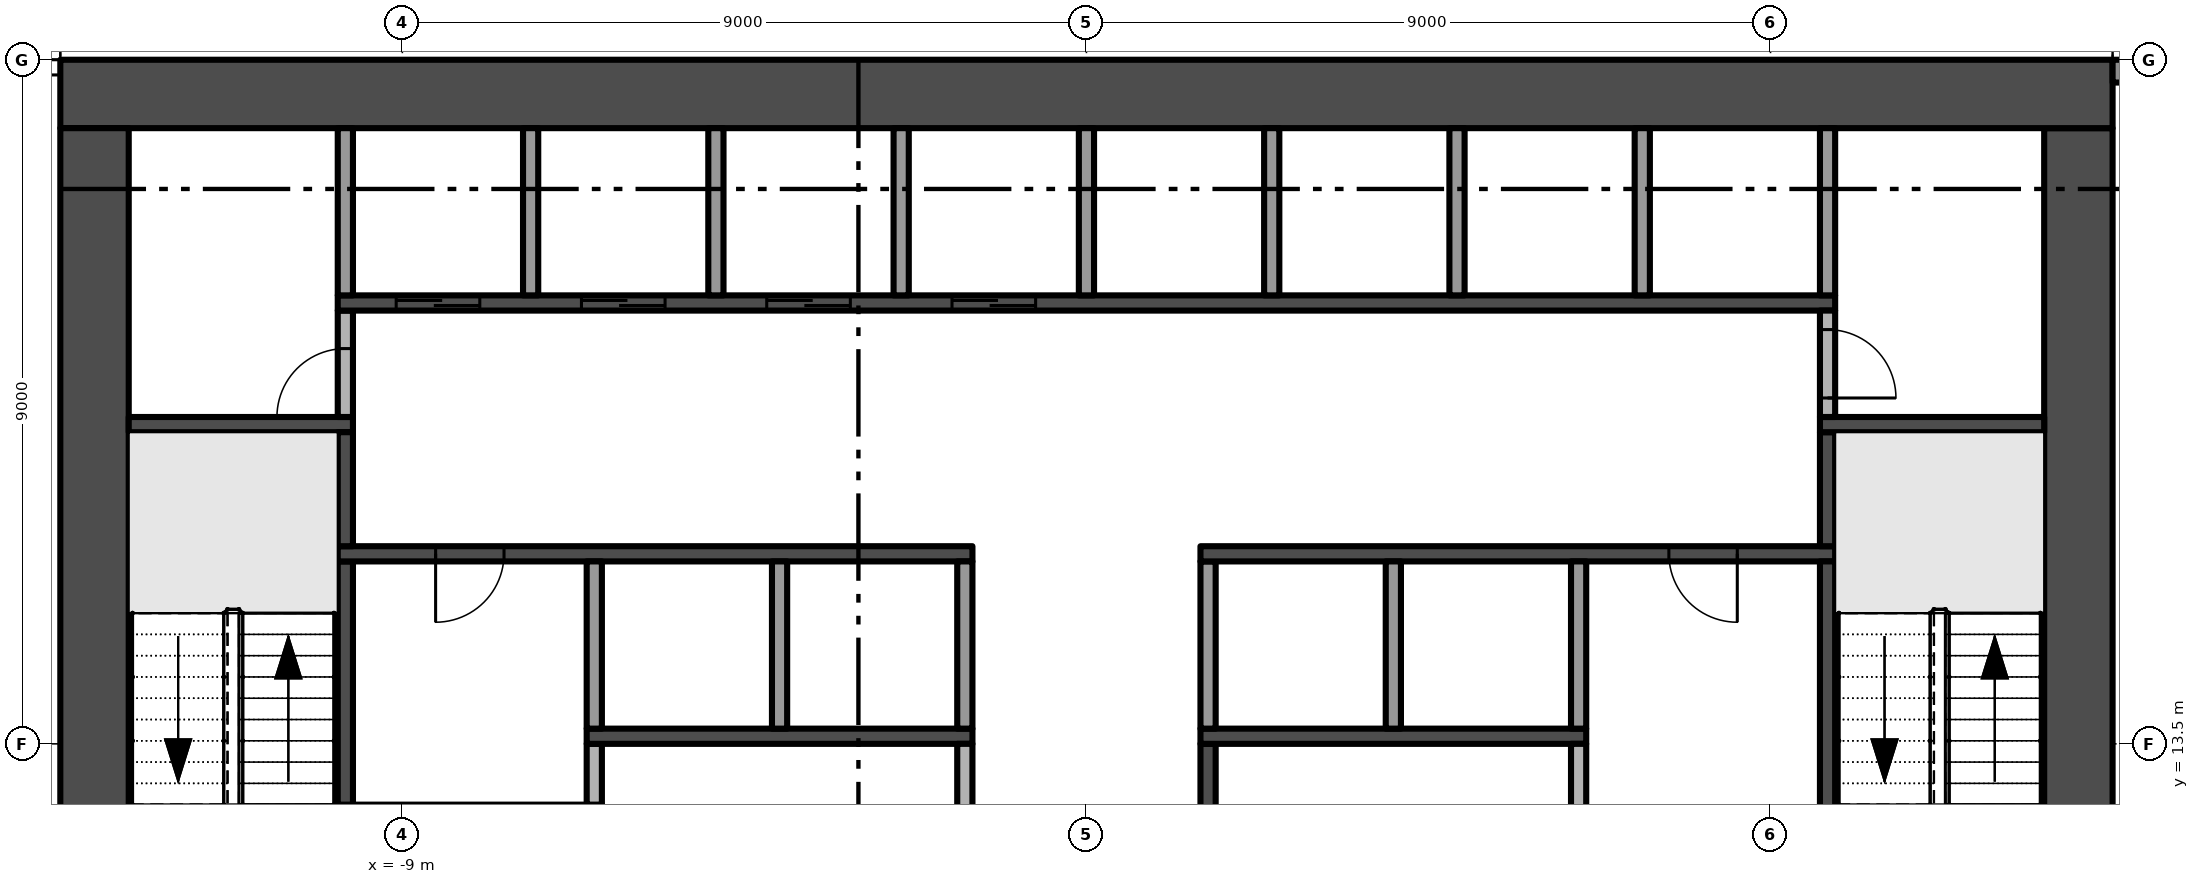
"""IFC4 building model, lengths in metres.
Left out: names, types, materials, properties, quantities, classifications, styles, units other than length and angle.
Written with IfcOpenShell. Run it as: python <this file> out.ifc"""

import sys

from ifc_helpers import new_model, si_unit, direction, frame, frame_2d, origin, place, context, subcontext, project, spatial, rectangle, extrude, element, fill, save


model = new_model("IFC4")
c1 = context("Model", 3, precision=1e-05, world=origin(), true_north=direction((0.0, 1.0)))
c2 = subcontext(c1, "Body", "Model", "MODEL_VIEW")
j1 = project(units=[si_unit("LENGTHUNIT", "METRE"), si_unit("PLANEANGLEUNIT", "RADIAN")], contexts=[c1])
p1 = place(None, origin())
s1 = spatial("IfcSite", under=j1, at=p1, CompositionType="ELEMENT")
p2 = place(p1, origin())
s2 = spatial("IfcBuilding", under=s1, at=p2, CompositionType="ELEMENT")
p3 = place(p2, frame((0.0, 0.0, 64.4)))
s3 = spatial("IfcBuildingStorey", under=s2, at=p3, CompositionType="ELEMENT", Elevation=64.4)
p4 = place(p3, frame((13.05, 5.4, -0.3), z_axis=(0.0, 0.0, 1.0), x_axis=(0.0, 1.0, 0.0)))
e1 = element("IfcWall", 1, at=p4, inside=s3, PredefinedType="SHEAR", context=c2, shape_type="SweptSolid", body=[
    extrude(rectangle(XDim=16.2, YDim=0.9, at=frame_2d((8.1, 0.0))), origin(), (0.0, 0.0, 1.0), 5.0),
])
p5 = place(p4, frame((6.0, 0.0, 0.3)))
e2 = element("IfcOpeningElement", 2, at=p5, cuts=e1, PredefinedType="OPENING", context=c2, shape_type="SweptSolid", body=[
    extrude(rectangle(XDim=1.2, YDim=2.2, at=frame_2d((0.6, 1.1))), frame((0.0, 0.46, 0.0), z_axis=(0.0, -1.0, 0.0), x_axis=(1.0, 0.0, 0.0)), (0.0, 0.0, 1.0), 0.92),
])
p6 = place(p3, frame((13.5, 22.05, -0.3), z_axis=(0.0, 0.0, 1.0), x_axis=(-1.0, 0.0, 0.0)))
e3 = element("IfcWall", 3, at=p6, inside=s3, PredefinedType="SHEAR", context=c2, shape_type="SweptSolid", body=[
    extrude(rectangle(XDim=27.0, YDim=0.9, at=frame_2d((13.5, 0.0))), origin(), (0.0, 0.0, 1.0), 5.0),
])
p7 = place(p3, frame((-13.05, 21.6, -0.3), z_axis=(0.0, 0.0, 1.0), x_axis=(0.0, -1.0, 0.0)))
e4 = element("IfcWall", 4, at=p7, inside=s3, PredefinedType="SHEAR", context=c2, shape_type="SweptSolid", body=[
    extrude(rectangle(XDim=16.2, YDim=0.9, at=frame_2d((8.1, 0.0))), origin(), (0.0, 0.0, 1.0), 5.0),
])
p8 = place(p7, frame((9.0, 0.0, 0.3)))
e5 = element("IfcOpeningElement", 5, at=p8, cuts=e4, PredefinedType="OPENING", context=c2, shape_type="SweptSolid", body=[
    extrude(rectangle(XDim=1.2, YDim=2.2, at=frame_2d((0.6, 1.1))), frame((0.0, 0.46, 0.0), z_axis=(0.0, -1.0, 0.0), x_axis=(1.0, 0.0, 0.0)), (0.0, 0.0, 1.0), 0.92),
])
p9 = place(p3, frame((13.5, 22.35, 0.0), z_axis=(0.0, 0.0, 1.0), x_axis=(1.0, 0.0, 0.0)))
e6 = element("IfcWall", 6, at=p9, inside=s3, PredefinedType="SOLIDWALL", context=c2, shape_type="SweptSolid", body=[
    extrude(rectangle(XDim=3.825, YDim=0.3, at=frame_2d((1.913, 0.0))), origin(), (0.0, 0.0, 1.0), 4.7),
])
p10 = place(p9, frame((0.775, 0.0, 0.0)))
e7 = element("IfcOpeningElement", 7, at=p10, cuts=e6, PredefinedType="OPENING", context=c2, shape_type="SweptSolid", body=[
    extrude(rectangle(XDim=2.725, YDim=2.4, at=frame_2d((1.363, 1.2))), frame((0.0, 0.16, 0.0), z_axis=(0.0, -1.0, 0.0), x_axis=(1.0, 0.0, 0.0)), (0.0, 0.0, 1.0), 0.32),
])
p11 = place(p3, frame((-12.6, 17.7, 0.0), z_axis=(0.0, 0.0, 1.0), x_axis=(1.0, 0.0, 0.0)))
e8 = element("IfcWall", 8, at=p11, inside=s3, PredefinedType="SHEAR", context=c2, shape_type="SweptSolid", body=[
    extrude(rectangle(XDim=2.95, YDim=0.2, at=frame_2d((1.475, 0.0))), origin(), (0.0, 0.0, 1.0), 4.7),
])
p12 = place(p3, frame((-9.75, 12.7, 0.0), z_axis=(0.0, 0.0, 1.0), x_axis=(0.0, 1.0, 0.0)))
e9 = element("IfcWall", 9, at=p12, inside=s3, PredefinedType="SHEAR", context=c2, shape_type="SweptSolid", body=[
    extrude(rectangle(XDim=3.2, YDim=0.2, at=frame_2d((1.6, 0.0))), origin(), (0.0, 0.0, 1.0), 4.7),
])
p13 = place(p3, frame((-1.5, 16.0, 0.0), z_axis=(0.0, 0.0, 1.0), x_axis=(-1.0, 0.0, 0.0)))
e10 = element("IfcWall", 10, at=p13, inside=s3, PredefinedType="SHEAR", context=c2, shape_type="SweptSolid", body=[
    extrude(rectangle(XDim=8.35, YDim=0.2, at=frame_2d((4.175, 0.0))), origin(), (0.0, 0.0, 1.0), 4.7),
])
p14 = place(p13, frame((6.162, 0.0, 0.0)))
e11 = element("IfcOpeningElement", 11, at=p14, cuts=e10, PredefinedType="OPENING", context=c2, shape_type="SweptSolid", body=[
    extrude(rectangle(XDim=0.9, YDim=2.1, at=frame_2d((0.45, 1.05))), frame((0.0, 0.11, 0.0), z_axis=(0.0, -1.0, 0.0), x_axis=(1.0, 0.0, 0.0)), (0.0, 0.0, 1.0), 0.22),
])
p15 = place(p3, frame((-9.75, 16.1, 0.0), z_axis=(0.0, 0.0, 1.0), x_axis=(0.0, 1.0, 0.0)))
e12 = element("IfcWall", 12, at=p15, inside=s3, PredefinedType="SHEAR", context=c2, shape_type="SweptSolid", body=[
    extrude(rectangle(XDim=1.5, YDim=0.2, at=frame_2d((0.75, 0.0))), origin(), (0.0, 0.0, 1.0), 4.7),
])
p16 = place(p3, frame((-9.75, 17.8, 0.0), z_axis=(0.0, 0.0, 1.0), x_axis=(0.0, 1.0, 0.0)))
e13 = element("IfcWall", 13, at=p16, inside=s3, PredefinedType="PARTITIONING", context=c2, shape_type="SweptSolid", body=[
    extrude(rectangle(XDim=1.4, YDim=0.2, at=frame_2d((0.7, 0.0))), origin(), (0.0, 0.0, 1.0), 4.7),
])
p17 = place(p16, origin())
e14 = element("IfcOpeningElement", 14, at=p17, cuts=e13, PredefinedType="OPENING", context=c2, shape_type="SweptSolid", body=[
    extrude(rectangle(XDim=0.9, YDim=2.1, at=frame_2d((0.45, 1.05))), frame((0.0, 0.11, 0.0), z_axis=(0.0, -1.0, 0.0), x_axis=(1.0, 0.0, 0.0)), (0.0, 0.0, 1.0), 0.22),
])
p18 = place(p3, frame((-9.85, 19.3, 0.0), z_axis=(0.0, 0.0, 1.0), x_axis=(1.0, 0.0, 0.0)))
e15 = element("IfcWall", 15, at=p18, inside=s3, PredefinedType="SHEAR", context=c2, shape_type="SweptSolid", body=[
    extrude(rectangle(XDim=19.7, YDim=0.2, at=frame_2d((9.85, 0.0))), origin(), (0.0, 0.0, 1.0), 4.7),
])
p19 = place(p18, frame((0.769, 0.0, 0.0)))
e16 = element("IfcOpeningElement", 16, at=p19, cuts=e15, PredefinedType="OPENING", context=c2, shape_type="SweptSolid", body=[
    extrude(rectangle(XDim=1.1, YDim=2.1, at=frame_2d((0.55, 1.05))), frame((0.0, 0.11, 0.0), z_axis=(0.0, -1.0, 0.0), x_axis=(1.0, 0.0, 0.0)), (0.0, 0.0, 1.0), 0.22),
])
p20 = place(p18, frame((3.206, 0.0, 0.0)))
e17 = element("IfcOpeningElement", 17, at=p20, cuts=e15, PredefinedType="OPENING", context=c2, shape_type="SweptSolid", body=[
    extrude(rectangle(XDim=1.1, YDim=2.1, at=frame_2d((0.55, 1.05))), frame((0.0, 0.11, 0.0), z_axis=(0.0, -1.0, 0.0), x_axis=(1.0, 0.0, 0.0)), (0.0, 0.0, 1.0), 0.22),
])
p21 = place(p18, frame((5.644, 0.0, 0.0)))
e18 = element("IfcOpeningElement", 18, at=p21, cuts=e15, PredefinedType="OPENING", context=c2, shape_type="SweptSolid", body=[
    extrude(rectangle(XDim=1.1, YDim=2.1, at=frame_2d((0.55, 1.05))), frame((0.0, 0.11, 0.0), z_axis=(0.0, -1.0, 0.0), x_axis=(1.0, 0.0, 0.0)), (0.0, 0.0, 1.0), 0.22),
])
p22 = place(p18, frame((8.081, 0.0, 0.0)))
e19 = element("IfcOpeningElement", 19, at=p22, cuts=e15, PredefinedType="OPENING", context=c2, shape_type="SweptSolid", body=[
    extrude(rectangle(XDim=1.1, YDim=2.1, at=frame_2d((0.55, 1.05))), frame((0.0, 0.11, 0.0), z_axis=(0.0, -1.0, 0.0), x_axis=(1.0, 0.0, 0.0)), (0.0, 0.0, 1.0), 0.22),
])
for number, where, z_axis, x_axis in (
    (20, (-9.75, 19.4, 0.0), (0.0, 0.0, 1.0), (0.0, 1.0, 0.0)),
    (21, (-7.312, 19.4, 0.0), (0.0, 0.0, 1.0), (0.0, 1.0, 0.0)),
):
    element("IfcWall", number, at=place(p3, frame(where, z_axis=z_axis, x_axis=x_axis)), inside=s3, PredefinedType="PARTITIONING", context=c2, shape_type="SweptSolid", body=[
        extrude(rectangle(XDim=2.2, YDim=0.2, at=frame_2d((1.1, 0.0))), origin(), (0.0, 0.0, 1.0), 4.7),
    ])
p23 = place(p3, frame((-6.475, 12.7, 0.0), z_axis=(0.0, 0.0, 1.0), x_axis=(0.0, 1.0, 0.0)))
e22 = element("IfcWall", 22, at=p23, inside=s3, PredefinedType="PARTITIONING", context=c2, shape_type="SweptSolid", body=[
    extrude(rectangle(XDim=0.8, YDim=0.2, at=frame_2d((0.4, 0.0))), origin(), (0.0, 0.0, 1.0), 4.7),
])
p24 = place(p3, frame((-6.575, 13.6, 0.0), z_axis=(0.0, 0.0, 1.0), x_axis=(1.0, 0.0, 0.0)))
e23 = element("IfcWall", 23, at=p24, inside=s3, PredefinedType="SHEAR", context=c2, shape_type="SweptSolid", body=[
    extrude(rectangle(XDim=5.075, YDim=0.2, at=frame_2d((2.538, 0.0))), origin(), (0.0, 0.0, 1.0), 4.7),
])
for number, where, z_axis, x_axis in (
    (24, (-6.475, 13.7, 0.0), (0.0, 0.0, 1.0), (0.0, 1.0, 0.0)),
    (25, (-4.875, 19.4, 0.0), (0.0, 0.0, 1.0), (0.0, 1.0, 0.0)),
    (26, (-4.037, 13.7, 0.0), (0.0, 0.0, 1.0), (0.0, 1.0, 0.0)),
    (27, (-2.438, 19.4, 0.0), (0.0, 0.0, 1.0), (0.0, 1.0, 0.0)),
):
    element("IfcWall", number, at=place(p3, frame(where, z_axis=z_axis, x_axis=x_axis)), inside=s3, PredefinedType="PARTITIONING", context=c2, shape_type="SweptSolid", body=[
        extrude(rectangle(XDim=2.2, YDim=0.2, at=frame_2d((1.1, 0.0))), origin(), (0.0, 0.0, 1.0), 4.7),
    ])
p25 = place(p3, frame((-1.6, 10.5, 0.0), z_axis=(0.0, 0.0, 1.0), x_axis=(0.0, 1.0, 0.0)))
e28 = element("IfcWall", 28, at=p25, inside=s3, PredefinedType="PARTITIONING", context=c2, shape_type="SweptSolid", body=[
    extrude(rectangle(XDim=3.0, YDim=0.2, at=frame_2d((1.5, 0.0))), origin(), (0.0, 0.0, 1.0), 4.7),
])
p26 = place(p25, frame((1.05, 0.0, 0.0)))
e29 = element("IfcOpeningElement", 29, at=p26, cuts=e28, PredefinedType="OPENING", context=c2, shape_type="SweptSolid", body=[
    extrude(rectangle(XDim=0.9, YDim=2.1, at=frame_2d((0.45, 1.05))), frame((0.0, 0.11, 0.0), z_axis=(0.0, -1.0, 0.0), x_axis=(1.0, 0.0, 0.0)), (0.0, 0.0, 1.0), 0.22),
])
for number, where, z_axis, x_axis in (
    (30, (-1.6, 13.7, 0.0), (0.0, 0.0, 1.0), (0.0, 1.0, 0.0)),
    (31, (0.0, 19.4, 0.0), (0.0, 0.0, 1.0), (0.0, 1.0, 0.0)),
):
    element("IfcWall", number, at=place(p3, frame(where, z_axis=z_axis, x_axis=x_axis)), inside=s3, PredefinedType="PARTITIONING", context=c2, shape_type="SweptSolid", body=[
        extrude(rectangle(XDim=2.2, YDim=0.2, at=frame_2d((1.1, 0.0))), origin(), (0.0, 0.0, 1.0), 4.7),
    ])
p27 = place(p3, frame((1.6, 13.5, 0.0), z_axis=(0.0, 0.0, 1.0), x_axis=(0.0, -1.0, 0.0)))
e32 = element("IfcWall", 32, at=p27, inside=s3, PredefinedType="SHEAR", context=c2, shape_type="SweptSolid", body=[
    extrude(rectangle(XDim=4.1, YDim=0.2, at=frame_2d((2.05, 0.0))), origin(), (0.0, 0.0, 1.0), 4.7),
])
p28 = place(p27, frame((1.6, 0.0, 0.0)))
e33 = element("IfcOpeningElement", 33, at=p28, cuts=e32, PredefinedType="OPENING", context=c2, shape_type="SweptSolid", body=[
    extrude(rectangle(XDim=0.9, YDim=2.1, at=frame_2d((0.45, 1.05))), frame((0.0, 0.11, 0.0), z_axis=(0.0, -1.0, 0.0), x_axis=(1.0, 0.0, 0.0)), (0.0, 0.0, 1.0), 0.22),
])
p29 = place(p3, frame((1.5, 13.6, 0.0), z_axis=(0.0, 0.0, 1.0), x_axis=(1.0, 0.0, 0.0)))
e34 = element("IfcWall", 34, at=p29, inside=s3, PredefinedType="SHEAR", context=c2, shape_type="SweptSolid", body=[
    extrude(rectangle(XDim=5.075, YDim=0.2, at=frame_2d((2.538, 0.0))), origin(), (0.0, 0.0, 1.0), 4.7),
])
p30 = place(p3, frame((1.6, 13.7, 0.0), z_axis=(0.0, 0.0, 1.0), x_axis=(0.0, 1.0, 0.0)))
e35 = element("IfcWall", 35, at=p30, inside=s3, PredefinedType="PARTITIONING", context=c2, shape_type="SweptSolid", body=[
    extrude(rectangle(XDim=2.2, YDim=0.2, at=frame_2d((1.1, 0.0))), origin(), (0.0, 0.0, 1.0), 4.7),
])
p31 = place(p3, frame((9.85, 16.0, 0.0), z_axis=(0.0, 0.0, 1.0), x_axis=(-1.0, 0.0, 0.0)))
e36 = element("IfcWall", 36, at=p31, inside=s3, PredefinedType="SHEAR", context=c2, shape_type="SweptSolid", body=[
    extrude(rectangle(XDim=8.35, YDim=0.2, at=frame_2d((4.175, 0.0))), origin(), (0.0, 0.0, 1.0), 4.7),
])
p32 = place(p31, frame((1.288, 0.0, 0.0)))
e37 = element("IfcOpeningElement", 37, at=p32, cuts=e36, PredefinedType="OPENING", context=c2, shape_type="SweptSolid", body=[
    extrude(rectangle(XDim=0.9, YDim=2.1, at=frame_2d((0.45, 1.05))), frame((0.0, 0.11, 0.0), z_axis=(0.0, -1.0, 0.0), x_axis=(1.0, 0.0, 0.0)), (0.0, 0.0, 1.0), 0.22),
])
for number, where, z_axis, x_axis in (
    (38, (2.438, 19.4, 0.0), (0.0, 0.0, 1.0), (0.0, 1.0, 0.0)),
    (39, (4.037, 13.7, 0.0), (0.0, 0.0, 1.0), (0.0, 1.0, 0.0)),
    (40, (4.875, 19.4, 0.0), (0.0, 0.0, 1.0), (0.0, 1.0, 0.0)),
):
    element("IfcWall", number, at=place(p3, frame(where, z_axis=z_axis, x_axis=x_axis)), inside=s3, PredefinedType="PARTITIONING", context=c2, shape_type="SweptSolid", body=[
        extrude(rectangle(XDim=2.2, YDim=0.2, at=frame_2d((1.1, 0.0))), origin(), (0.0, 0.0, 1.0), 4.7),
    ])
p33 = place(p3, frame((6.475, 12.3, 0.0), z_axis=(0.0, 0.0, 1.0), x_axis=(0.0, 1.0, 0.0)))
e41 = element("IfcWall", 41, at=p33, inside=s3, PredefinedType="PARTITIONING", context=c2, shape_type="SweptSolid", body=[
    extrude(rectangle(XDim=1.2, YDim=0.2, at=frame_2d((0.6, 0.0))), origin(), (0.0, 0.0, 1.0), 4.7),
])
for number, where, z_axis, x_axis in (
    (42, (6.475, 13.7, 0.0), (0.0, 0.0, 1.0), (0.0, 1.0, 0.0)),
    (43, (7.312, 19.4, 0.0), (0.0, 0.0, 1.0), (0.0, 1.0, 0.0)),
):
    element("IfcWall", number, at=place(p3, frame(where, z_axis=z_axis, x_axis=x_axis)), inside=s3, PredefinedType="PARTITIONING", context=c2, shape_type="SweptSolid", body=[
        extrude(rectangle(XDim=2.2, YDim=0.2, at=frame_2d((1.1, 0.0))), origin(), (0.0, 0.0, 1.0), 4.7),
    ])
p34 = place(p3, frame((9.75, 12.3, 0.0), z_axis=(0.0, 0.0, 1.0), x_axis=(0.0, 1.0, 0.0)))
e44 = element("IfcWall", 44, at=p34, inside=s3, PredefinedType="SHEAR", context=c2, shape_type="SweptSolid", body=[
    extrude(rectangle(XDim=3.6, YDim=0.2, at=frame_2d((1.8, 0.0))), origin(), (0.0, 0.0, 1.0), 4.7),
])
p35 = place(p3, frame((9.75, 16.1, 0.0), z_axis=(0.0, 0.0, 1.0), x_axis=(0.0, 1.0, 0.0)))
e45 = element("IfcWall", 45, at=p35, inside=s3, PredefinedType="SHEAR", context=c2, shape_type="SweptSolid", body=[
    extrude(rectangle(XDim=1.5, YDim=0.2, at=frame_2d((0.75, 0.0))), origin(), (0.0, 0.0, 1.0), 4.7),
])
p36 = place(p3, frame((9.65, 17.7, 0.0), z_axis=(0.0, 0.0, 1.0), x_axis=(1.0, 0.0, 0.0)))
e46 = element("IfcWall", 46, at=p36, inside=s3, PredefinedType="SHEAR", context=c2, shape_type="SweptSolid", body=[
    extrude(rectangle(XDim=2.95, YDim=0.2, at=frame_2d((1.475, 0.0))), origin(), (0.0, 0.0, 1.0), 4.7),
])
p37 = place(p3, frame((9.75, 19.2, 0.0), z_axis=(0.0, 0.0, 1.0), x_axis=(0.0, -1.0, 0.0)))
e47 = element("IfcWall", 47, at=p37, inside=s3, PredefinedType="PARTITIONING", context=c2, shape_type="SweptSolid", body=[
    extrude(rectangle(XDim=1.4, YDim=0.2, at=frame_2d((0.7, 0.0))), origin(), (0.0, 0.0, 1.0), 4.7),
])
p38 = place(p37, frame((0.25, 0.0, 0.0)))
e48 = element("IfcOpeningElement", 48, at=p38, cuts=e47, PredefinedType="OPENING", context=c2, shape_type="SweptSolid", body=[
    extrude(rectangle(XDim=0.9, YDim=2.1, at=frame_2d((0.45, 1.05))), frame((0.0, 0.11, 0.0), z_axis=(0.0, -1.0, 0.0), x_axis=(1.0, 0.0, 0.0)), (0.0, 0.0, 1.0), 0.22),
])
p39 = place(p3, frame((9.75, 19.4, 0.0), z_axis=(0.0, 0.0, 1.0), x_axis=(0.0, 1.0, 0.0)))
e49 = element("IfcWall", 49, at=p39, inside=s3, PredefinedType="PARTITIONING", context=c2, shape_type="SweptSolid", body=[
    extrude(rectangle(XDim=2.2, YDim=0.2, at=frame_2d((1.1, 0.0))), origin(), (0.0, 0.0, 1.0), 4.7),
])
p40 = place(p19, origin())
e50 = element("IfcDoor", 50, at=p40, inside=s3, OperationType="SLIDING_TO_LEFT", PredefinedType="DOOR", context=c2, shape_type="SweptSolid", body=[
    extrude(rectangle(XDim=1.1, YDim=2.1, at=frame_2d((0.55, 1.05))), frame((0.0, 0.025, 0.0), z_axis=(0.0, -1.0, 0.0), x_axis=(1.0, 0.0, 0.0)), (0.0, 0.0, 1.0), 0.05),
])
fill(e16, e50)
p41 = place(p20, origin())
e51 = element("IfcDoor", 51, at=p41, inside=s3, OperationType="SLIDING_TO_LEFT", PredefinedType="DOOR", context=c2, shape_type="SweptSolid", body=[
    extrude(rectangle(XDim=1.1, YDim=2.1, at=frame_2d((0.55, 1.05))), frame((0.0, 0.025, 0.0), z_axis=(0.0, -1.0, 0.0), x_axis=(1.0, 0.0, 0.0)), (0.0, 0.0, 1.0), 0.05),
])
fill(e17, e51)
p42 = place(p21, origin())
e52 = element("IfcDoor", 52, at=p42, inside=s3, OperationType="SLIDING_TO_LEFT", PredefinedType="DOOR", context=c2, shape_type="SweptSolid", body=[
    extrude(rectangle(XDim=1.1, YDim=2.1, at=frame_2d((0.55, 1.05))), frame((0.0, 0.025, 0.0), z_axis=(0.0, -1.0, 0.0), x_axis=(1.0, 0.0, 0.0)), (0.0, 0.0, 1.0), 0.05),
])
fill(e18, e52)
p43 = place(p22, origin())
e53 = element("IfcDoor", 53, at=p43, inside=s3, OperationType="SLIDING_TO_LEFT", PredefinedType="DOOR", context=c2, shape_type="SweptSolid", body=[
    extrude(rectangle(XDim=1.1, YDim=2.1, at=frame_2d((0.55, 1.05))), frame((0.0, 0.025, 0.0), z_axis=(0.0, -1.0, 0.0), x_axis=(1.0, 0.0, 0.0)), (0.0, 0.0, 1.0), 0.05),
])
fill(e19, e53)
p44 = place(p14, origin())
e54 = element("IfcDoor", 54, at=p44, inside=s3, OperationType="SINGLE_SWING_RIGHT", PredefinedType="DOOR", context=c2, shape_type="SweptSolid", body=[
    extrude(rectangle(XDim=0.9, YDim=2.1, at=frame_2d((0.45, 1.05))), frame((0.0, 0.025, 0.0), z_axis=(0.0, -1.0, 0.0), x_axis=(1.0, 0.0, 0.0)), (0.0, 0.0, 1.0), 0.05),
])
fill(e11, e54)
p45 = place(p32, origin())
e55 = element("IfcDoor", 55, at=p45, inside=s3, OperationType="SINGLE_SWING_LEFT", PredefinedType="DOOR", context=c2, shape_type="SweptSolid", body=[
    extrude(rectangle(XDim=0.9, YDim=2.1, at=frame_2d((0.45, 1.05))), frame((0.0, 0.025, 0.0), z_axis=(0.0, -1.0, 0.0), x_axis=(1.0, 0.0, 0.0)), (0.0, 0.0, 1.0), 0.05),
])
fill(e37, e55)
p46 = place(p17, origin())
e56 = element("IfcDoor", 56, at=p46, inside=s3, OperationType="SINGLE_SWING_LEFT", PredefinedType="DOOR", context=c2, shape_type="SweptSolid", body=[
    extrude(rectangle(XDim=0.9, YDim=2.1, at=frame_2d((0.45, 1.05))), frame((0.0, 0.025, 0.0), z_axis=(0.0, -1.0, 0.0), x_axis=(1.0, 0.0, 0.0)), (0.0, 0.0, 1.0), 0.05),
])
fill(e14, e56)
p47 = place(p38, origin())
e57 = element("IfcDoor", 57, at=p47, inside=s3, OperationType="SINGLE_SWING_RIGHT", PredefinedType="DOOR", context=c2, shape_type="SweptSolid", body=[
    extrude(rectangle(XDim=0.9, YDim=2.1, at=frame_2d((0.45, 1.05))), frame((0.0, 0.025, 0.0), z_axis=(0.0, -1.0, 0.0), x_axis=(1.0, 0.0, 0.0)), (0.0, 0.0, 1.0), 0.05),
])
fill(e48, e57)
save(model, sys.argv[1])
